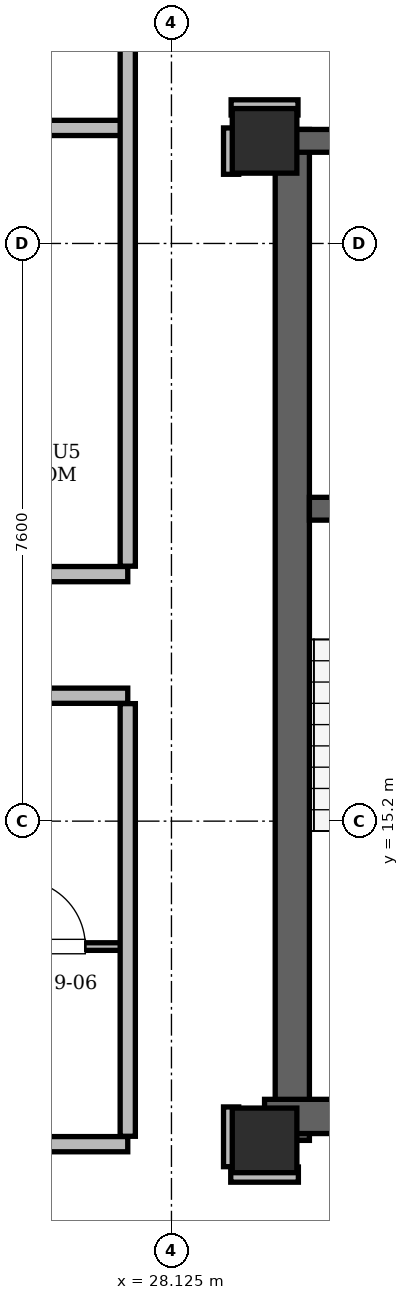
"""IFC4 building model, lengths in metres.
Left out: names, types, materials, properties, quantities, classifications, styles, units other than length and angle.
Written with IfcOpenShell. Run it as: python <this file> out.ifc"""

import sys

from ifc_helpers import new_model, si_unit, direction, frame, frame_2d, origin, origin_2d, place, context, subcontext, project, spatial, rectangle, hollow_rectangle, extrude, element, fill, save


model = new_model("IFC4")
c1 = context("Model", 3, precision=1e-05, world=origin(), true_north=direction((0.0, 1.0)))
c2 = subcontext(c1, "Body", "Model", "MODEL_VIEW")
j1 = project(units=[si_unit("LENGTHUNIT", "METRE"), si_unit("PLANEANGLEUNIT", "RADIAN")], contexts=[c1])
p1 = place(None, origin())
s1 = spatial("IfcSite", under=j1, at=p1, CompositionType="ELEMENT")
p2 = place(p1, origin())
s2 = spatial("IfcBuilding", under=s1, at=p2, CompositionType="ELEMENT")
p3 = place(p2, frame((0.0, 0.0, 112.2)))
s3 = spatial("IfcBuildingStorey", under=s2, at=p3, CompositionType="ELEMENT", Elevation=112.2)
for number, where, z_axis, x_axis in (
    (1, (29.35, 11.0, 0.0), (0.0, 0.0, 1.0), (1.0, 0.0, 0.0)),
    (2, (29.35, 24.15, 0.0), (0.0, 0.0, 1.0), (1.0, 0.0, 0.0)),
):
    element("IfcColumn", number, at=place(p3, frame(where, z_axis=z_axis, x_axis=x_axis)), inside=s3, PredefinedType="COLUMN", context=c2, shape_type="SweptSolid", body=[
        extrude(hollow_rectangle(XDim=0.85, YDim=0.85, WallThickness=0.07, at=origin_2d()), origin(), (0.0, 0.0, 1.0), 3.6),
    ])
p4 = place(p3, frame((29.715, 11.0, 0.0), z_axis=(0.0, 0.0, 1.0), x_axis=(0.0, 1.0, 0.0)))
e3 = element("IfcWall", 3, at=p4, inside=s3, PredefinedType="SHEAR", context=c2, shape_type="SweptSolid", body=[
    extrude(rectangle(XDim=13.3, YDim=0.45, at=frame_2d((6.65, 0.0))), origin(), (0.0, 0.0, 1.0), 3.36),
])
p5 = place(p3, frame((29.35, 11.315, 0.0), z_axis=(0.0, 0.0, 1.0), x_axis=(1.0, 0.0, 0.0)))
e4 = element("IfcWall", 4, at=p5, inside=s3, PredefinedType="SHEAR", context=c2, shape_type="SweptSolid", body=[
    extrude(rectangle(XDim=7.1, YDim=0.45, at=frame_2d((3.55, 0.0))), origin(), (0.0, 0.0, 1.0), 3.36),
])
p6 = place(p3, frame((29.65, 24.15, 0.0), z_axis=(0.0, 0.0, 1.0), x_axis=(1.0, 0.0, 0.0)))
e5 = element("IfcWall", 5, at=p6, inside=s3, PredefinedType="SHEAR", context=c2, shape_type="SweptSolid", body=[
    extrude(rectangle(XDim=15.7, YDim=0.3, at=frame_2d((7.85, 0.0))), origin(), (0.0, 0.0, 1.0), 3.36),
])
p7 = place(p6, frame((1.7, 0.0, 0.0)))
e6 = element("IfcOpeningElement", 6, at=p7, cuts=e5, PredefinedType="OPENING", context=c2, shape_type="SweptSolid", body=[
    extrude(rectangle(XDim=1.2, YDim=2.2, at=frame_2d((0.6, 1.1))), frame((0.0, 0.15, 0.0), z_axis=(0.0, -1.0, 0.0), x_axis=(1.0, 0.0, 0.0)), (0.0, 0.0, 1.0), 0.3),
])
p8 = place(p6, frame((12.8, 0.0, 0.0)))
e7 = element("IfcOpeningElement", 7, at=p8, cuts=e5, PredefinedType="OPENING", context=c2, shape_type="SweptSolid", body=[
    extrude(rectangle(XDim=1.2, YDim=2.2, at=frame_2d((0.6, 1.1))), frame((0.0, 0.15, 0.0), z_axis=(0.0, -1.0, 0.0), x_axis=(1.0, 0.0, 0.0)), (0.0, 0.0, 1.0), 0.3),
])
p9 = place(p6, frame((6.55, 0.0, 0.0)))
e8 = element("IfcOpeningElement", 8, at=p9, cuts=e5, PredefinedType="OPENING", context=c2, shape_type="SweptSolid", body=[
    extrude(rectangle(XDim=0.9, YDim=2.05, at=frame_2d((0.45, 1.025))), frame((0.0, 0.15, 0.0), z_axis=(0.0, -1.0, 0.0), x_axis=(1.0, 0.0, 0.0)), (0.0, 0.0, 1.0), 0.3),
])
p10 = place(p6, frame((8.45, 0.0, 0.0)))
e9 = element("IfcOpeningElement", 9, at=p10, cuts=e5, PredefinedType="OPENING", context=c2, shape_type="SweptSolid", body=[
    extrude(rectangle(XDim=0.9, YDim=2.05, at=frame_2d((0.45, 1.025))), frame((0.0, 0.15, 0.0), z_axis=(0.0, -1.0, 0.0), x_axis=(1.0, 0.0, 0.0)), (0.0, 0.0, 1.0), 0.3),
])
p11 = place(p3, frame((29.94, 19.31, 0.0), z_axis=(0.0, 0.0, 1.0), x_axis=(1.0, 0.0, 0.0)))
e10 = element("IfcWall", 10, at=p11, inside=s3, PredefinedType="SHEAR", context=c2, shape_type="SweptSolid", body=[
    extrude(rectangle(XDim=4.01, YDim=0.3, at=frame_2d((2.005, 0.0))), origin(), (0.0, 0.0, 1.0), 3.36),
])
p12 = place(p11, frame((1.01, 0.0, 0.0)))
e11 = element("IfcOpeningElement", 11, at=p12, cuts=e10, PredefinedType="OPENING", context=c2, shape_type="SweptSolid", body=[
    extrude(rectangle(XDim=1.4, YDim=2.2, at=frame_2d((0.7, 1.1))), frame((0.0, 0.15, 0.0), z_axis=(0.0, -1.0, 0.0), x_axis=(1.0, 0.0, 0.0)), (0.0, 0.0, 1.0), 0.3),
])
p13 = place(p3, frame((31.85, 43.425, 0.0), z_axis=(0.0, 0.0, 1.0), x_axis=(-0.500004027594, -0.866023078439, 0.0)))
e12 = element("IfcWall", 12, at=p13, inside=s3, PredefinedType="SOLIDWALL", context=c2, shape_type="SweptSolid", body=[
    extrude(rectangle(XDim=34.75, YDim=0.34, at=frame_2d((17.375, 0.0))), origin(), (0.0, 0.0, 1.0), 2.578),
])
p14 = place(p13, frame((6.369, 0.0, 0.0)))
e13 = element("IfcOpeningElement", 13, at=p14, cuts=e12, PredefinedType="OPENING", context=c2, shape_type="SweptSolid", body=[
    extrude(rectangle(XDim=1.5, YDim=2.2, at=frame_2d((0.75, 1.1))), frame((0.0, 0.17, 0.0), z_axis=(0.0, -1.0, 0.0), x_axis=(1.0, 0.0, 0.0)), (0.0, 0.0, 1.0), 0.34),
])
p15 = place(p13, frame((25.216, 0.0, 0.0)))
e14 = element("IfcOpeningElement", 14, at=p15, cuts=e12, PredefinedType="OPENING", context=c2, shape_type="SweptSolid", body=[
    extrude(rectangle(XDim=1.5, YDim=2.2, at=frame_2d((0.75, 1.1))), frame((0.0, 0.17, 0.0), z_axis=(0.0, -1.0, 0.0), x_axis=(1.0, 0.0, 0.0)), (0.0, 0.0, 1.0), 0.34),
])
p16 = place(p13, frame((32.486, 0.0, 0.85)))
e15 = element("IfcOpeningElement", 15, at=p16, cuts=e12, PredefinedType="OPENING", context=c2, shape_type="SweptSolid", body=[
    extrude(rectangle(XDim=1.2, YDim=1.48, at=frame_2d((0.6, 0.74))), frame((0.0, 0.17, 0.0), z_axis=(0.0, -1.0, 0.0), x_axis=(1.0, 0.0, 0.0)), (0.0, 0.0, 1.0), 0.34),
])
p17 = place(p13, frame((27.16, 0.0, 0.85)))
e16 = element("IfcOpeningElement", 16, at=p17, cuts=e12, PredefinedType="OPENING", context=c2, shape_type="SweptSolid", body=[
    extrude(rectangle(XDim=1.2, YDim=1.48, at=frame_2d((0.6, 0.74))), frame((0.0, 0.17, 0.0), z_axis=(0.0, -1.0, 0.0), x_axis=(1.0, 0.0, 0.0)), (0.0, 0.0, 1.0), 0.34),
])
p18 = place(p13, frame((3.218, 0.0, 0.85)))
e17 = element("IfcOpeningElement", 17, at=p18, cuts=e12, PredefinedType="OPENING", context=c2, shape_type="SweptSolid", body=[
    extrude(rectangle(XDim=1.2, YDim=1.48, at=frame_2d((0.6, 0.74))), frame((0.0, 0.17, 0.0), z_axis=(0.0, -1.0, 0.0), x_axis=(1.0, 0.0, 0.0)), (0.0, 0.0, 1.0), 0.34),
])
p19 = place(p13, frame((14.421, 0.0, 0.85)))
e18 = element("IfcOpeningElement", 18, at=p19, cuts=e12, PredefinedType="OPENING", context=c2, shape_type="SweptSolid", body=[
    extrude(rectangle(XDim=1.2, YDim=1.48, at=frame_2d((0.6, 0.74))), frame((0.0, 0.17, 0.0), z_axis=(0.0, -1.0, 0.0), x_axis=(1.0, 0.0, 0.0)), (0.0, 0.0, 1.0), 0.34),
])
p20 = place(p3, frame((28.905, 10.55, 0.0), z_axis=(0.0, 0.0, 1.0), x_axis=(1.0, 0.0, 0.0)))
e19 = element("IfcWall", 19, at=p20, inside=s3, PredefinedType="PARTITIONING", context=c2, shape_type="SweptSolid", body=[
    extrude(rectangle(XDim=0.89, YDim=0.2, at=frame_2d((0.445, 0.0))), origin(), (0.0, 0.0, 1.0), 3.36),
])
p21 = place(p3, frame((16.05, 10.95, 0.0), z_axis=(0.0, 0.0, 1.0), x_axis=(1.0, 0.0, 0.0)))
e20 = element("IfcWall", 20, at=p21, inside=s3, PredefinedType="PARTITIONING", context=c2, shape_type="SweptSolid", body=[
    extrude(rectangle(XDim=11.5, YDim=0.2, at=frame_2d((5.75, 0.0))), origin(), (0.0, 0.0, 1.0), 3.36),
])
p22 = place(p3, frame((14.867, 13.55, 0.0), z_axis=(0.0, 0.0, 1.0), x_axis=(1.0, 0.0, 0.0)))
e21 = element("IfcWall", 21, at=p22, inside=s3, PredefinedType="PARTITIONING", context=c2, shape_type="SweptSolid", body=[
    extrude(rectangle(XDim=12.733, YDim=0.1, at=frame_2d((6.366, 0.0))), origin(), (0.0, 0.0, 1.0), 3.36),
])
p23 = place(p22, frame((3.281, 0.0, 0.0)))
e22 = element("IfcOpeningElement", 22, at=p23, cuts=e21, PredefinedType="OPENING", context=c2, shape_type="SweptSolid", body=[
    extrude(rectangle(XDim=0.92, YDim=2.12, at=frame_2d((0.46, 1.06))), frame((0.0, 0.05, 0.0), z_axis=(0.0, -1.0, 0.0), x_axis=(1.0, 0.0, 0.0)), (0.0, 0.0, 1.0), 0.1),
])
p24 = place(p22, frame((8.657, 0.0, 0.0)))
e23 = element("IfcOpeningElement", 23, at=p24, cuts=e21, PredefinedType="OPENING", context=c2, shape_type="SweptSolid", body=[
    extrude(rectangle(XDim=0.95, YDim=2.1, at=frame_2d((0.475, 1.05))), frame((0.0, 0.05, 0.0), z_axis=(0.0, -1.0, 0.0), x_axis=(1.0, 0.0, 0.0)), (0.0, 0.0, 1.0), 0.1),
])
p25 = place(p22, frame((11.245, 0.0, 0.0)))
e24 = element("IfcOpeningElement", 24, at=p25, cuts=e21, PredefinedType="OPENING", context=c2, shape_type="SweptSolid", body=[
    extrude(rectangle(XDim=0.88, YDim=2.08, at=frame_2d((0.44, 1.04))), frame((0.0, 0.05, 0.0), z_axis=(0.0, -1.0, 0.0), x_axis=(1.0, 0.0, 0.0)), (0.0, 0.0, 1.0), 0.1),
])
p26 = place(p3, frame((16.708, 16.85, 0.0), z_axis=(0.0, 0.0, 1.0), x_axis=(1.0, 0.0, 0.0)))
e25 = element("IfcWall", 25, at=p26, inside=s3, PredefinedType="PARTITIONING", context=c2, shape_type="SweptSolid", body=[
    extrude(rectangle(XDim=10.842, YDim=0.2, at=frame_2d((5.421, 0.0))), origin(), (0.0, 0.0, 1.0), 3.36),
])
p27 = place(p26, frame((4.052, 0.0, 0.0)))
e26 = element("IfcOpeningElement", 26, at=p27, cuts=e25, PredefinedType="OPENING", context=c2, shape_type="SweptSolid", body=[
    extrude(rectangle(XDim=1.0, YDim=2.18, at=frame_2d((0.5, 1.09))), frame((0.0, 0.1, 0.0), z_axis=(0.0, -1.0, 0.0), x_axis=(1.0, 0.0, 0.0)), (0.0, 0.0, 1.0), 0.2),
])
p28 = place(p3, frame((17.632, 18.45, 0.0), z_axis=(0.0, 0.0, 1.0), x_axis=(1.0, 0.0, 0.0)))
e27 = element("IfcWall", 27, at=p28, inside=s3, PredefinedType="PARTITIONING", context=c2, shape_type="SweptSolid", body=[
    extrude(rectangle(XDim=9.918, YDim=0.2, at=frame_2d((4.959, 0.0))), origin(), (0.0, 0.0, 1.0), 3.36),
])
p29 = place(p28, frame((2.944, 0.0, 0.0)))
e28 = element("IfcOpeningElement", 28, at=p29, cuts=e27, PredefinedType="OPENING", context=c2, shape_type="SweptSolid", body=[
    extrude(rectangle(XDim=1.0, YDim=2.18, at=frame_2d((0.5, 1.09))), frame((0.0, 0.1, 0.0), z_axis=(0.0, -1.0, 0.0), x_axis=(1.0, 0.0, 0.0)), (0.0, 0.0, 1.0), 0.2),
])
p30 = place(p3, frame((21.021, 24.32, 0.0), z_axis=(0.0, 0.0, 1.0), x_axis=(1.0, 0.0, 0.0)))
e29 = element("IfcWall", 29, at=p30, inside=s3, PredefinedType="PARTITIONING", context=c2, shape_type="SweptSolid", body=[
    extrude(rectangle(XDim=6.529, YDim=0.2, at=frame_2d((3.265, 0.0))), origin(), (0.0, 0.0, 1.0), 3.36),
])
p31 = place(p3, frame((28.91, 24.59, 0.0), z_axis=(0.0, 0.0, 1.0), x_axis=(1.0, 0.0, 0.0)))
e30 = element("IfcWall", 30, at=p31, inside=s3, PredefinedType="PARTITIONING", context=c2, shape_type="SweptSolid", body=[
    extrude(rectangle(XDim=0.88, YDim=0.2, at=frame_2d((0.44, 0.0))), origin(), (0.0, 0.0, 1.0), 2.814),
])
p32 = place(p3, frame((27.55, 11.054, 0.0), z_axis=(0.0, 0.0, 1.0), x_axis=(0.0, 1.0, 0.0)))
e31 = element("IfcWall", 31, at=p32, inside=s3, PredefinedType="PARTITIONING", context=c2, shape_type="SweptSolid", body=[
    extrude(rectangle(XDim=5.692, YDim=0.2, at=frame_2d((2.846, 0.0))), origin(), (0.0, 0.0, 1.0), 2.814),
])
p33 = place(p3, frame((27.55, 18.554, 0.0), z_axis=(0.0, 0.0, 1.0), x_axis=(0.0, 1.0, 0.0)))
e32 = element("IfcWall", 32, at=p33, inside=s3, PredefinedType="PARTITIONING", context=c2, shape_type="SweptSolid", body=[
    extrude(rectangle(XDim=7.312, YDim=0.2, at=frame_2d((3.656, 0.0))), origin(), (0.0, 0.0, 1.0), 3.36),
])
p34 = place(p3, frame((28.91, 10.654, 0.0), z_axis=(0.0, 0.0, 1.0), x_axis=(0.0, 1.0, 0.0)))
e33 = element("IfcWall", 33, at=p34, inside=s3, PredefinedType="PARTITIONING", context=c2, shape_type="SweptSolid", body=[
    extrude(rectangle(XDim=0.786, YDim=0.2, at=frame_2d((0.393, 0.0))), origin(), (0.0, 0.0, 1.0), 2.814),
])
p35 = place(p3, frame((28.91, 23.71, 0.0), z_axis=(0.0, 0.0, 1.0), x_axis=(0.0, 1.0, 0.0)))
e34 = element("IfcWall", 34, at=p35, inside=s3, PredefinedType="PARTITIONING", context=c2, shape_type="SweptSolid", body=[
    extrude(rectangle(XDim=0.61, YDim=0.2, at=frame_2d((0.305, 0.0))), origin(), (0.0, 0.0, 1.0), 3.36),
])
p36 = place(p25, origin())
e35 = element("IfcDoor", 35, at=p36, inside=s3, OperationType="SINGLE_SWING_LEFT", PredefinedType="DOOR", context=c2, shape_type="SweptSolid", body=[
    extrude(rectangle(XDim=0.88, YDim=2.08, at=frame_2d((0.44, 1.04))), frame((0.0, 0.025, 0.0), z_axis=(0.0, -1.0, 0.0), x_axis=(1.0, 0.0, 0.0)), (0.0, 0.0, 1.0), 0.05),
])
fill(e24, e35)
save(model, sys.argv[1])
